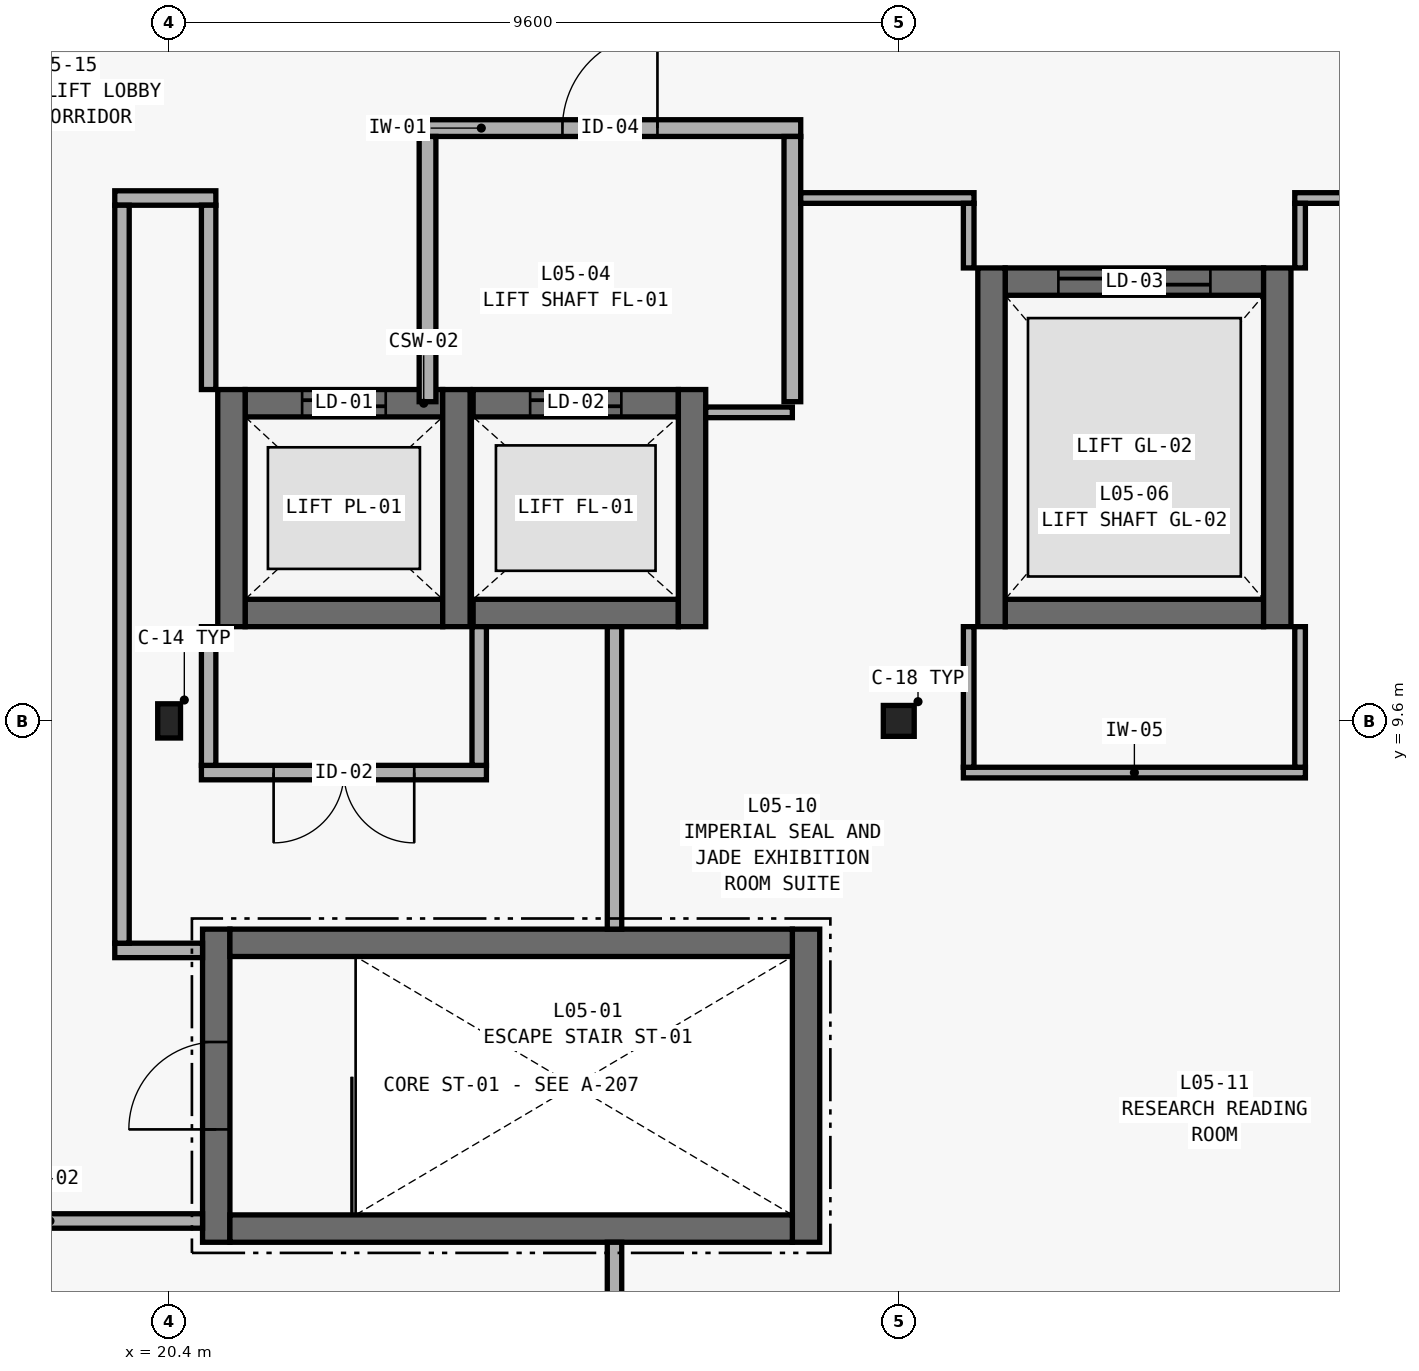
"""IFC4 building model, lengths in metres.
Left out: names, types, materials, properties, quantities, classifications, styles, units other than length and angle.
Written with IfcOpenShell. Run it as: python <this file> out.ifc"""

import sys

from ifc_helpers import new_model, si_unit, direction, frame, frame_2d, origin, origin_2d, place, context, subcontext, project, spatial, rectangle, hollow_circle, i_section, extrude, element, fill, save


model = new_model("IFC4")
c1 = context("Model", 3, precision=1e-05, world=origin(), true_north=direction((0.0, 1.0)))
c2 = subcontext(c1, "Body", "Model", "MODEL_VIEW")
j1 = project(units=[si_unit("LENGTHUNIT", "METRE"), si_unit("PLANEANGLEUNIT", "RADIAN")], contexts=[c1])
p1 = place(None, origin())
s1 = spatial("IfcSite", under=j1, at=p1, CompositionType="ELEMENT")
p2 = place(p1, origin())
s2 = spatial("IfcBuilding", under=s1, at=p2, CompositionType="ELEMENT")
p3 = place(p2, frame((0.0, 0.0, 25.5)))
s3 = spatial("IfcBuildingStorey", under=s2, at=p3, CompositionType="ELEMENT", Elevation=25.5)
p4 = place(p3, frame((20.4, 9.6, 0.0), z_axis=(0.0, 0.0, 1.0), x_axis=(1.0, 0.0, 0.0)))
e1 = element("IfcColumn", 1, at=p4, inside=s3, PredefinedType="COLUMN", context=c2, shape_type="SweptSolid", body=[
    extrude(i_section(OverallWidth=0.3, OverallDepth=0.45, WebThickness=0.014, FlangeThickness=0.026, FilletRadius=0.027, at=origin_2d()), origin(), (0.0, 0.0, 1.0), 4.2),
])
p5 = place(p3, frame((30.0, 9.6, 0.0), z_axis=(0.0, 0.0, 1.0), x_axis=(1.0, 0.0, 0.0)))
e2 = element("IfcColumn", 2, at=p5, inside=s3, PredefinedType="COLUMN", context=c2, shape_type="SweptSolid", body=[
    extrude(hollow_circle(Radius=0.203, WallThickness=0.02, at=origin_2d()), origin(), (0.0, 0.0, 1.0), 4.2),
])
p6 = place(p3, frame((21.02, 2.74, 0.0), z_axis=(0.0, 0.0, 1.0), x_axis=(0.0, 1.0, 0.0)))
e3 = element("IfcWall", 3, at=p6, inside=s3, PredefinedType="SHEAR", context=c2, shape_type="SweptSolid", body=[
    extrude(rectangle(XDim=4.12, YDim=0.36, at=frame_2d((2.06, 0.0))), origin(), (0.0, 0.0, 1.0), 3.96),
])
p7 = place(p6, frame((1.485, 0.0, 0.0)))
e4 = element("IfcOpeningElement", 4, at=p7, cuts=e3, PredefinedType="OPENING", context=c2, shape_type="SweptSolid", body=[
    extrude(rectangle(XDim=1.15, YDim=2.15, at=frame_2d((0.575, 1.075))), frame((0.0, 0.195, 0.0), z_axis=(0.0, -1.0, 0.0), x_axis=(1.0, 0.0, 0.0)), (0.0, 0.0, 1.0), 0.39),
])
p8 = place(p3, frame((28.78, 2.74, 0.0), z_axis=(0.0, 0.0, 1.0), x_axis=(0.0, 1.0, 0.0)))
e5 = element("IfcWall", 5, at=p8, inside=s3, PredefinedType="SHEAR", context=c2, shape_type="SweptSolid", body=[
    extrude(rectangle(XDim=4.12, YDim=0.36, at=frame_2d((2.06, 0.0))), origin(), (0.0, 0.0, 1.0), 3.96),
])
for number, where, z_axis, x_axis in (
    (6, (21.2, 6.68, 0.0), (0.0, 0.0, 1.0), (1.0, 0.0, 0.0)),
    (7, (21.2, 2.92, 0.0), (0.0, 0.0, 1.0), (1.0, 0.0, 0.0)),
):
    element("IfcWall", number, at=place(p3, frame(where, z_axis=z_axis, x_axis=x_axis)), inside=s3, PredefinedType="SHEAR", context=c2, shape_type="SweptSolid", body=[
        extrude(rectangle(XDim=7.4, YDim=0.36, at=frame_2d((3.7, 0.0))), origin(), (0.0, 0.0, 1.0), 3.96),
    ])
p9 = place(p3, frame((21.4, 13.78, 0.0), z_axis=(0.0, 0.0, 1.0), x_axis=(1.0, 0.0, 0.0)))
e8 = element("IfcWall", 8, at=p9, inside=s3, PredefinedType="SHEAR", context=c2, shape_type="SweptSolid", body=[
    extrude(rectangle(XDim=2.6, YDim=0.36, at=frame_2d((1.3, 0.0))), origin(), (0.0, 0.0, 1.0), 3.96),
])
p10 = place(p9, frame((0.75, 0.0, 0.0)))
e9 = element("IfcOpeningElement", 9, at=p10, cuts=e8, PredefinedType="OPENING", context=c2, shape_type="SweptSolid", body=[
    extrude(rectangle(XDim=1.1, YDim=2.15, at=frame_2d((0.55, 1.075))), frame((0.0, 0.195, 0.0), z_axis=(0.0, -1.0, 0.0), x_axis=(1.0, 0.0, 0.0)), (0.0, 0.0, 1.0), 0.39),
])
p11 = place(p3, frame((21.4, 11.02, 0.0), z_axis=(0.0, 0.0, 1.0), x_axis=(1.0, 0.0, 0.0)))
e10 = element("IfcWall", 10, at=p11, inside=s3, PredefinedType="SHEAR", context=c2, shape_type="SweptSolid", body=[
    extrude(rectangle(XDim=2.6, YDim=0.36, at=frame_2d((1.3, 0.0))), origin(), (0.0, 0.0, 1.0), 3.96),
])
for number, where, z_axis, x_axis in (
    (11, (21.22, 10.84, 0.0), (0.0, 0.0, 1.0), (0.0, 1.0, 0.0)),
    (12, (24.18, 10.84, 0.0), (0.0, 0.0, 1.0), (0.0, 1.0, 0.0)),
):
    element("IfcWall", number, at=place(p3, frame(where, z_axis=z_axis, x_axis=x_axis)), inside=s3, PredefinedType="SHEAR", context=c2, shape_type="SweptSolid", body=[
        extrude(rectangle(XDim=3.12, YDim=0.36, at=frame_2d((1.56, 0.0))), origin(), (0.0, 0.0, 1.0), 3.96),
    ])
p12 = place(p3, frame((24.4, 13.78, 0.0), z_axis=(0.0, 0.0, 1.0), x_axis=(1.0, 0.0, 0.0)))
e13 = element("IfcWall", 13, at=p12, inside=s3, PredefinedType="SHEAR", context=c2, shape_type="SweptSolid", body=[
    extrude(rectangle(XDim=2.7, YDim=0.36, at=frame_2d((1.35, 0.0))), origin(), (0.0, 0.0, 1.0), 3.96),
])
p13 = place(p12, frame((0.75, 0.0, 0.0)))
e14 = element("IfcOpeningElement", 14, at=p13, cuts=e13, PredefinedType="OPENING", context=c2, shape_type="SweptSolid", body=[
    extrude(rectangle(XDim=1.2, YDim=2.15, at=frame_2d((0.6, 1.075))), frame((0.0, 0.195, 0.0), z_axis=(0.0, -1.0, 0.0), x_axis=(1.0, 0.0, 0.0)), (0.0, 0.0, 1.0), 0.39),
])
p14 = place(p3, frame((24.4, 11.02, 0.0), z_axis=(0.0, 0.0, 1.0), x_axis=(1.0, 0.0, 0.0)))
e15 = element("IfcWall", 15, at=p14, inside=s3, PredefinedType="SHEAR", context=c2, shape_type="SweptSolid", body=[
    extrude(rectangle(XDim=2.7, YDim=0.36, at=frame_2d((1.35, 0.0))), origin(), (0.0, 0.0, 1.0), 3.96),
])
p15 = place(p3, frame((27.28, 10.84, 0.0), z_axis=(0.0, 0.0, 1.0), x_axis=(0.0, 1.0, 0.0)))
e16 = element("IfcWall", 16, at=p15, inside=s3, PredefinedType="SHEAR", context=c2, shape_type="SweptSolid", body=[
    extrude(rectangle(XDim=3.12, YDim=0.36, at=frame_2d((1.56, 0.0))), origin(), (0.0, 0.0, 1.0), 3.96),
])
p16 = place(p3, frame((23.69, 17.4, 0.0), z_axis=(0.0, 0.0, 1.0), x_axis=(1.0, 0.0, 0.0)))
e17 = element("IfcWall", 17, at=p16, inside=s3, PredefinedType="PARTITIONING", context=c2, shape_type="SweptSolid", body=[
    extrude(rectangle(XDim=5.02, YDim=0.22, at=frame_2d((2.51, 0.0))), origin(), (0.0, 0.0, 1.0), 2.84),
])
p17 = place(p16, frame((1.885, 0.0, 0.0)))
e18 = element("IfcOpeningElement", 18, at=p17, cuts=e17, PredefinedType="OPENING", context=c2, shape_type="SweptSolid", body=[
    extrude(rectangle(XDim=1.25, YDim=2.15, at=frame_2d((0.625, 1.075))), frame((0.0, 0.125, 0.0), z_axis=(0.0, -1.0, 0.0), x_axis=(1.0, 0.0, 0.0)), (0.0, 0.0, 1.0), 0.25),
])
for number, where, z_axis, x_axis in (
    (19, (23.8, 13.8, 0.0), (0.0, 0.0, 1.0), (0.0, 1.0, 0.0)),
    (20, (28.6, 13.8, 0.0), (0.0, 0.0, 1.0), (0.0, 1.0, 0.0)),
):
    element("IfcWall", number, at=place(p3, frame(where, z_axis=z_axis, x_axis=x_axis)), inside=s3, PredefinedType="PARTITIONING", context=c2, shape_type="SweptSolid", body=[
        extrude(rectangle(XDim=3.49, YDim=0.22, at=frame_2d((1.745, 0.0))), origin(), (0.0, 0.0, 1.0), 2.84),
    ])
p18 = place(p3, frame((31.4, 15.38, 0.0), z_axis=(0.0, 0.0, 1.0), x_axis=(1.0, 0.0, 0.0)))
e21 = element("IfcWall", 21, at=p18, inside=s3, PredefinedType="SHEAR", context=c2, shape_type="SweptSolid", body=[
    extrude(rectangle(XDim=3.4, YDim=0.36, at=frame_2d((1.7, 0.0))), origin(), (0.0, 0.0, 1.0), 3.96),
])
p19 = place(p18, frame((0.7, 0.0, 0.0)))
e22 = element("IfcOpeningElement", 22, at=p19, cuts=e21, PredefinedType="OPENING", context=c2, shape_type="SweptSolid", body=[
    extrude(rectangle(XDim=2.0, YDim=2.4, at=frame_2d((1.0, 1.2))), frame((0.0, 0.195, 0.0), z_axis=(0.0, -1.0, 0.0), x_axis=(1.0, 0.0, 0.0)), (0.0, 0.0, 1.0), 0.39),
])
p20 = place(p3, frame((31.4, 11.02, 0.0), z_axis=(0.0, 0.0, 1.0), x_axis=(1.0, 0.0, 0.0)))
e23 = element("IfcWall", 23, at=p20, inside=s3, PredefinedType="SHEAR", context=c2, shape_type="SweptSolid", body=[
    extrude(rectangle(XDim=3.4, YDim=0.36, at=frame_2d((1.7, 0.0))), origin(), (0.0, 0.0, 1.0), 3.96),
])
for number, where, z_axis, x_axis in (
    (24, (31.22, 10.84, 0.0), (0.0, 0.0, 1.0), (0.0, 1.0, 0.0)),
    (25, (34.98, 10.84, 0.0), (0.0, 0.0, 1.0), (0.0, 1.0, 0.0)),
):
    element("IfcWall", number, at=place(p3, frame(where, z_axis=z_axis, x_axis=x_axis)), inside=s3, PredefinedType="SHEAR", context=c2, shape_type="SweptSolid", body=[
        extrude(rectangle(XDim=4.72, YDim=0.36, at=frame_2d((2.36, 0.0))), origin(), (0.0, 0.0, 1.0), 3.96),
    ])
p21 = place(p3, frame((16.825, 3.02, 0.0), z_axis=(0.0, 0.0, 1.0), x_axis=(1.0, 0.0, 0.0)))
e26 = element("IfcWall", 26, at=p21, inside=s3, PredefinedType="PARTITIONING", context=c2, shape_type="SweptSolid", body=[
    extrude(rectangle(XDim=4.015, YDim=0.19, at=frame_2d((2.008, 0.0))), origin(), (0.0, 0.0, 1.0), 2.84),
])
p22 = place(p3, frame((19.685, 6.58, 0.0), z_axis=(0.0, 0.0, 1.0), x_axis=(1.0, 0.0, 0.0)))
e27 = element("IfcWall", 27, at=p22, inside=s3, PredefinedType="PARTITIONING", context=c2, shape_type="SweptSolid", body=[
    extrude(rectangle(XDim=1.155, YDim=0.19, at=frame_2d((0.578, 0.0))), origin(), (0.0, 0.0, 1.0), 2.84),
])
p23 = place(p3, frame((20.825, 8.92, 0.0), z_axis=(0.0, 0.0, 1.0), x_axis=(1.0, 0.0, 0.0)))
e28 = element("IfcWall", 28, at=p23, inside=s3, PredefinedType="PARTITIONING", context=c2, shape_type="SweptSolid", body=[
    extrude(rectangle(XDim=3.75, YDim=0.19, at=frame_2d((1.875, 0.0))), origin(), (0.0, 0.0, 1.0), 2.84),
])
p24 = place(p23, frame((0.95, 0.0, 0.0)))
e29 = element("IfcOpeningElement", 29, at=p24, cuts=e28, PredefinedType="OPENING", context=c2, shape_type="SweptSolid", body=[
    extrude(rectangle(XDim=1.85, YDim=2.35, at=frame_2d((0.925, 1.175))), frame((0.0, 0.11, 0.0), z_axis=(0.0, -1.0, 0.0), x_axis=(1.0, 0.0, 0.0)), (0.0, 0.0, 1.0), 0.22),
])
p25 = place(p3, frame((30.85, 8.92, 0.0), z_axis=(0.0, 0.0, 1.0), x_axis=(1.0, 0.0, 0.0)))
e30 = element("IfcWall", 30, at=p25, inside=s3, PredefinedType="PARTITIONING", context=c2, shape_type="SweptSolid", body=[
    extrude(rectangle(XDim=4.5, YDim=0.14, at=frame_2d((2.25, 0.0))), origin(), (0.0, 0.0, 1.0), 2.84),
])
p26 = place(p3, frame((27.46, 13.66, 0.0), z_axis=(0.0, 0.0, 1.0), x_axis=(1.0, 0.0, 0.0)))
e31 = element("IfcWall", 31, at=p26, inside=s3, PredefinedType="PARTITIONING", context=c2, shape_type="SweptSolid", body=[
    extrude(rectangle(XDim=1.14, YDim=0.14, at=frame_2d((0.57, 0.0))), origin(), (0.0, 0.0, 1.0), 2.84),
])
p27 = place(p3, frame((19.685, 16.48, 0.0), z_axis=(0.0, 0.0, 1.0), x_axis=(1.0, 0.0, 0.0)))
e32 = element("IfcWall", 32, at=p27, inside=s3, PredefinedType="PARTITIONING", context=c2, shape_type="SweptSolid", body=[
    extrude(rectangle(XDim=1.33, YDim=0.19, at=frame_2d((0.665, 0.0))), origin(), (0.0, 0.0, 1.0), 2.84),
])
p28 = place(p3, frame((28.71, 16.48, 0.0), z_axis=(0.0, 0.0, 1.0), x_axis=(1.0, 0.0, 0.0)))
e33 = element("IfcWall", 33, at=p28, inside=s3, PredefinedType="PARTITIONING", context=c2, shape_type="SweptSolid", body=[
    extrude(rectangle(XDim=2.28, YDim=0.14, at=frame_2d((1.14, 0.0))), origin(), (0.0, 0.0, 1.0), 2.84),
])
p29 = place(p3, frame((35.21, 16.48, 0.0), z_axis=(0.0, 0.0, 1.0), x_axis=(1.0, 0.0, 0.0)))
e34 = element("IfcWall", 34, at=p29, inside=s3, PredefinedType="PARTITIONING", context=c2, shape_type="SweptSolid", body=[
    extrude(rectangle(XDim=4.095, YDim=0.14, at=frame_2d((2.047, 0.0))), origin(), (0.0, 0.0, 1.0), 2.84),
])
p30 = place(p29, frame((1.573, 0.0, 0.0)))
e35 = element("IfcOpeningElement", 35, at=p30, cuts=e34, PredefinedType="OPENING", context=c2, shape_type="SweptSolid", body=[
    extrude(rectangle(XDim=0.95, YDim=2.15, at=frame_2d((0.475, 1.075))), frame((0.0, 0.085, 0.0), z_axis=(0.0, -1.0, 0.0), x_axis=(1.0, 0.0, 0.0)), (0.0, 0.0, 1.0), 0.17),
])
p31 = place(p3, frame((19.78, 6.675, 0.0), z_axis=(0.0, 0.0, 1.0), x_axis=(0.0, 1.0, 0.0)))
e36 = element("IfcWall", 36, at=p31, inside=s3, PredefinedType="PARTITIONING", context=c2, shape_type="SweptSolid", body=[
    extrude(rectangle(XDim=9.71, YDim=0.19, at=frame_2d((4.855, 0.0))), origin(), (0.0, 0.0, 1.0), 2.84),
])
p32 = place(p3, frame((20.92, 9.015, 0.0), z_axis=(0.0, 0.0, 1.0), x_axis=(0.0, 1.0, 0.0)))
e37 = element("IfcWall", 37, at=p32, inside=s3, PredefinedType="PARTITIONING", context=c2, shape_type="SweptSolid", body=[
    extrude(rectangle(XDim=1.825, YDim=0.19, at=frame_2d((0.913, 0.0))), origin(), (0.0, 0.0, 1.0), 2.84),
])
p33 = place(p3, frame((20.92, 13.96, 0.0), z_axis=(0.0, 0.0, 1.0), x_axis=(0.0, 1.0, 0.0)))
e38 = element("IfcWall", 38, at=p33, inside=s3, PredefinedType="PARTITIONING", context=c2, shape_type="SweptSolid", body=[
    extrude(rectangle(XDim=2.425, YDim=0.19, at=frame_2d((1.212, 0.0))), origin(), (0.0, 0.0, 1.0), 2.84),
])
p34 = place(p3, frame((24.48, 9.015, 0.0), z_axis=(0.0, 0.0, 1.0), x_axis=(0.0, 1.0, 0.0)))
e39 = element("IfcWall", 39, at=p34, inside=s3, PredefinedType="PARTITIONING", context=c2, shape_type="SweptSolid", body=[
    extrude(rectangle(XDim=1.825, YDim=0.19, at=frame_2d((0.913, 0.0))), origin(), (0.0, 0.0, 1.0), 2.84),
])
p35 = place(p3, frame((26.26, -0.155, 0.0), z_axis=(0.0, 0.0, 1.0), x_axis=(0.0, 1.0, 0.0)))
e40 = element("IfcWall", 40, at=p35, inside=s3, PredefinedType="PARTITIONING", context=c2, shape_type="SweptSolid", body=[
    extrude(rectangle(XDim=2.895, YDim=0.19, at=frame_2d((1.448, 0.0))), origin(), (0.0, 0.0, 1.0), 2.84),
])
p36 = place(p3, frame((26.26, 6.86, 0.0), z_axis=(0.0, 0.0, 1.0), x_axis=(0.0, 1.0, 0.0)))
e41 = element("IfcWall", 41, at=p36, inside=s3, PredefinedType="PARTITIONING", context=c2, shape_type="SweptSolid", body=[
    extrude(rectangle(XDim=3.98, YDim=0.19, at=frame_2d((1.99, 0.0))), origin(), (0.0, 0.0, 1.0), 2.84),
])
p37 = place(p3, frame((30.92, 8.99, 0.0), z_axis=(0.0, 0.0, 1.0), x_axis=(0.0, 1.0, 0.0)))
e42 = element("IfcWall", 42, at=p37, inside=s3, PredefinedType="PARTITIONING", context=c2, shape_type="SweptSolid", body=[
    extrude(rectangle(XDim=1.85, YDim=0.14, at=frame_2d((0.925, 0.0))), origin(), (0.0, 0.0, 1.0), 2.84),
])
p38 = place(p3, frame((30.92, 15.56, 0.0), z_axis=(0.0, 0.0, 1.0), x_axis=(0.0, 1.0, 0.0)))
e43 = element("IfcWall", 43, at=p38, inside=s3, PredefinedType="PARTITIONING", context=c2, shape_type="SweptSolid", body=[
    extrude(rectangle(XDim=0.85, YDim=0.14, at=frame_2d((0.425, 0.0))), origin(), (0.0, 0.0, 1.0), 2.84),
])
p39 = place(p3, frame((35.28, 8.99, 0.0), z_axis=(0.0, 0.0, 1.0), x_axis=(0.0, 1.0, 0.0)))
e44 = element("IfcWall", 44, at=p39, inside=s3, PredefinedType="PARTITIONING", context=c2, shape_type="SweptSolid", body=[
    extrude(rectangle(XDim=1.85, YDim=0.14, at=frame_2d((0.925, 0.0))), origin(), (0.0, 0.0, 1.0), 2.84),
])
p40 = place(p3, frame((35.28, 15.56, 0.0), z_axis=(0.0, 0.0, 1.0), x_axis=(0.0, 1.0, 0.0)))
e45 = element("IfcWall", 45, at=p40, inside=s3, PredefinedType="PARTITIONING", context=c2, shape_type="SweptSolid", body=[
    extrude(rectangle(XDim=0.85, YDim=0.14, at=frame_2d((0.425, 0.0))), origin(), (0.0, 0.0, 1.0), 2.84),
])
p41 = place(p7, origin())
e46 = element("IfcDoor", 46, at=p41, inside=s3, OperationType="SINGLE_SWING_LEFT", PredefinedType="DOOR", context=c2, shape_type="SweptSolid", body=[
    extrude(rectangle(XDim=1.15, YDim=2.15, at=frame_2d((0.575, 1.075))), frame((0.0, 0.025, 0.0), z_axis=(0.0, -1.0, 0.0), x_axis=(1.0, 0.0, 0.0)), (0.0, 0.0, 1.0), 0.05),
])
fill(e4, e46)
p42 = place(p10, origin())
e47 = element("IfcDoor", 47, at=p42, inside=s3, OperationType="DOUBLE_DOOR_SLIDING", PredefinedType="DOOR", context=c2, shape_type="SweptSolid", body=[
    extrude(rectangle(XDim=1.1, YDim=2.15, at=frame_2d((0.55, 1.075))), frame((0.0, 0.025, 0.0), z_axis=(0.0, -1.0, 0.0), x_axis=(1.0, 0.0, 0.0)), (0.0, 0.0, 1.0), 0.05),
])
fill(e9, e47)
p43 = place(p13, origin())
e48 = element("IfcDoor", 48, at=p43, inside=s3, OperationType="DOUBLE_DOOR_SLIDING", PredefinedType="DOOR", context=c2, shape_type="SweptSolid", body=[
    extrude(rectangle(XDim=1.2, YDim=2.15, at=frame_2d((0.6, 1.075))), frame((0.0, 0.025, 0.0), z_axis=(0.0, -1.0, 0.0), x_axis=(1.0, 0.0, 0.0)), (0.0, 0.0, 1.0), 0.05),
])
fill(e14, e48)
p44 = place(p17, origin())
e49 = element("IfcDoor", 49, at=p44, inside=s3, OperationType="SINGLE_SWING_RIGHT", PredefinedType="DOOR", context=c2, shape_type="SweptSolid", body=[
    extrude(rectangle(XDim=1.25, YDim=2.15, at=frame_2d((0.625, 1.075))), frame((0.0, 0.025, 0.0), z_axis=(0.0, -1.0, 0.0), x_axis=(1.0, 0.0, 0.0)), (0.0, 0.0, 1.0), 0.05),
])
fill(e18, e49)
p45 = place(p19, origin())
e50 = element("IfcDoor", 50, at=p45, inside=s3, OperationType="DOUBLE_DOOR_SLIDING", PredefinedType="DOOR", context=c2, shape_type="SweptSolid", body=[
    extrude(rectangle(XDim=2.0, YDim=2.4, at=frame_2d((1.0, 1.2))), frame((0.0, 0.025, 0.0), z_axis=(0.0, -1.0, 0.0), x_axis=(1.0, 0.0, 0.0)), (0.0, 0.0, 1.0), 0.05),
])
fill(e22, e50)
p46 = place(p24, frame((1.85, 0.0, 0.0), z_axis=(0.0, 0.0, 1.0), x_axis=(-1.0, 0.0, 0.0)))
e51 = element("IfcDoor", 51, at=p46, inside=s3, OperationType="DOUBLE_DOOR_SINGLE_SWING", PredefinedType="DOOR", context=c2, shape_type="SweptSolid", body=[
    extrude(rectangle(XDim=1.85, YDim=2.35, at=frame_2d((0.925, 1.175))), frame((0.0, 0.025, 0.0), z_axis=(0.0, -1.0, 0.0), x_axis=(1.0, 0.0, 0.0)), (0.0, 0.0, 1.0), 0.05),
])
fill(e29, e51)
save(model, sys.argv[1])
